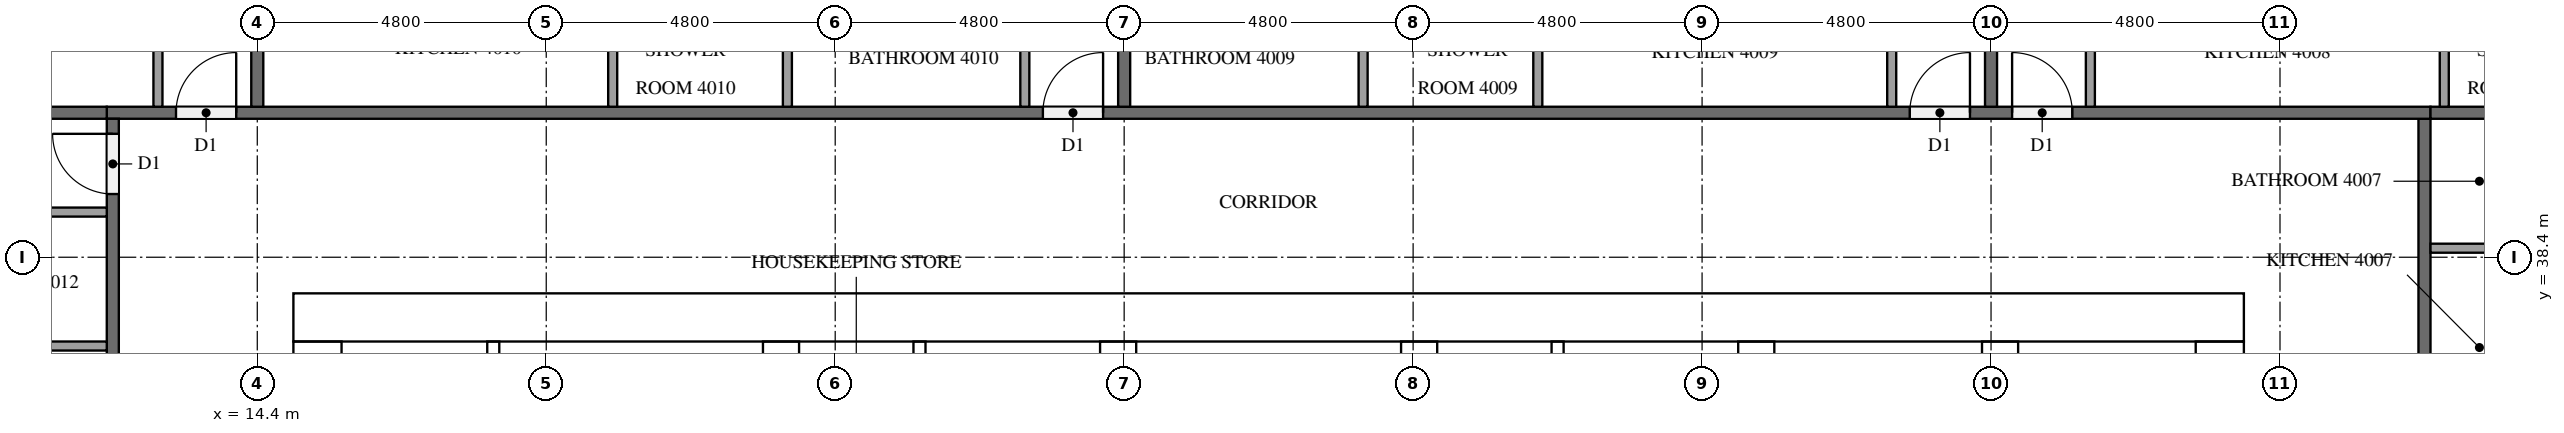
"""IFC4 building model, lengths in metres.
Left out: names, types, materials, properties, quantities, classifications, styles, units other than length and angle.
Written with IfcOpenShell. Run it as: python <this file> out.ifc"""

import sys

from ifc_helpers import new_model, si_unit, direction, frame, frame_2d, origin, place, context, subcontext, project, spatial, rectangle, extrude, element, fill, save


model = new_model("IFC4")
c1 = context("Model", 3, precision=1e-05, world=origin(), true_north=direction((0.0, 1.0)))
c2 = subcontext(c1, "Body", "Model", "MODEL_VIEW")
j1 = project(units=[si_unit("LENGTHUNIT", "METRE"), si_unit("PLANEANGLEUNIT", "RADIAN")], contexts=[c1])
p1 = place(None, origin())
s1 = spatial("IfcSite", under=j1, at=p1, CompositionType="ELEMENT")
p2 = place(p1, origin())
s2 = spatial("IfcBuilding", under=s1, at=p2, CompositionType="ELEMENT")
p3 = place(p2, frame((0.0, 0.0, 156.0)))
s3 = spatial("IfcBuildingStorey", under=s2, at=p3, CompositionType="ELEMENT", Elevation=156.0)
p4 = place(p3, frame((15.0, 37.4, 0.0), z_axis=(0.0, 0.0, 1.0), x_axis=(1.0, 0.0, 0.0)))
e1 = element("IfcWall", 1, at=p4, inside=s3, PredefinedType="SHEAR", context=c2, shape_type="SweptSolid", body=[
    extrude(rectangle(XDim=32.4, YDim=0.8, at=frame_2d((16.2, 0.0))), origin(), (0.0, 0.0, 1.0), 3.2),
])
p5 = place(p4, frame((15.3, 0.0, 0.0)))
e2 = element("IfcOpeningElement", 2, at=p5, cuts=e1, PredefinedType="OPENING", context=c2, shape_type="SweptSolid", body=[
    extrude(rectangle(XDim=1.8, YDim=2.1, at=frame_2d((0.9, 1.05))), frame((0.0, 0.41, 0.0), z_axis=(0.0, -1.0, 0.0), x_axis=(1.0, 0.0, 0.0)), (0.0, 0.0, 1.0), 0.82),
])
p6 = place(p4, frame((1.51, 0.0, 0.0)))
e3 = element("IfcOpeningElement", 3, at=p6, cuts=e1, PredefinedType="OPENING", context=c2, shape_type="SweptSolid", body=[
    extrude(rectangle(XDim=1.0, YDim=2.1, at=frame_2d((0.5, 1.05))), frame((0.0, 0.41, 0.0), z_axis=(0.0, -1.0, 0.0), x_axis=(1.0, 0.0, 0.0)), (0.0, 0.0, 1.0), 0.82),
])
p7 = place(p4, frame((5.11, 0.0, 0.0)))
e4 = element("IfcOpeningElement", 4, at=p7, cuts=e1, PredefinedType="OPENING", context=c2, shape_type="SweptSolid", body=[
    extrude(rectangle(XDim=1.0, YDim=2.1, at=frame_2d((0.5, 1.05))), frame((0.0, 0.41, 0.0), z_axis=(0.0, -1.0, 0.0), x_axis=(1.0, 0.0, 0.0)), (0.0, 0.0, 1.0), 0.82),
])
p8 = place(p3, frame((15.4, 15.8, 0.0), z_axis=(0.0, 0.0, 1.0), x_axis=(0.0, 1.0, 0.0)))
e5 = element("IfcWall", 5, at=p8, inside=s3, PredefinedType="SHEAR", context=c2, shape_type="SweptSolid", body=[
    extrude(rectangle(XDim=21.2, YDim=0.8, at=frame_2d((10.6, 0.0))), origin(), (0.0, 0.0, 1.0), 3.2),
])
p9 = place(p8, frame((4.96, 0.0, 0.0)))
e6 = element("IfcOpeningElement", 6, at=p9, cuts=e5, PredefinedType="OPENING", context=c2, shape_type="SweptSolid", body=[
    extrude(rectangle(XDim=1.2, YDim=2.1, at=frame_2d((0.6, 1.05))), frame((0.0, 0.41, 0.0), z_axis=(0.0, -1.0, 0.0), x_axis=(1.0, 0.0, 0.0)), (0.0, 0.0, 1.0), 0.82),
])
p10 = place(p3, frame((47.0, 15.8, 0.0), z_axis=(0.0, 0.0, 1.0), x_axis=(0.0, 1.0, 0.0)))
e7 = element("IfcWall", 7, at=p10, inside=s3, PredefinedType="SHEAR", context=c2, shape_type="SweptSolid", body=[
    extrude(rectangle(XDim=21.2, YDim=0.8, at=frame_2d((10.6, 0.0))), origin(), (0.0, 0.0, 1.0), 3.2),
])
p11 = place(p10, frame((10.3, 0.0, 0.0)))
e8 = element("IfcOpeningElement", 8, at=p11, cuts=e7, PredefinedType="OPENING", context=c2, shape_type="SweptSolid", body=[
    extrude(rectangle(XDim=1.2, YDim=2.1, at=frame_2d((0.6, 1.05))), frame((0.0, 0.41, 0.0), z_axis=(0.0, -1.0, 0.0), x_axis=(1.0, 0.0, 0.0)), (0.0, 0.0, 1.0), 0.82),
])
p12 = place(p3, frame((23.1, 15.8, 0.0), z_axis=(0.0, 0.0, 1.0), x_axis=(0.0, 1.0, 0.0)))
e9 = element("IfcWall", 9, at=p12, inside=s3, PredefinedType="SHEAR", context=c2, shape_type="SweptSolid", body=[
    extrude(rectangle(XDim=21.2, YDim=0.6, at=frame_2d((10.6, 0.0))), origin(), (0.0, 0.0, 1.0), 3.2),
])
p13 = place(p3, frame((39.3, 27.75, 0.0), z_axis=(0.0, 0.0, 1.0), x_axis=(0.0, 1.0, 0.0)))
e10 = element("IfcWall", 10, at=p13, inside=s3, PredefinedType="SHEAR", context=c2, shape_type="SweptSolid", body=[
    extrude(rectangle(XDim=9.25, YDim=0.6, at=frame_2d((4.625, 0.0))), origin(), (0.0, 0.0, 1.0), 3.2),
])
p14 = place(p3, frame((43.35, 27.75, 0.0), z_axis=(0.0, 0.0, 1.0), x_axis=(0.0, 1.0, 0.0)))
e11 = element("IfcWall", 11, at=p14, inside=s3, PredefinedType="SHEAR", context=c2, shape_type="SweptSolid", body=[
    extrude(rectangle(XDim=9.25, YDim=0.6, at=frame_2d((4.625, 0.0))), origin(), (0.0, 0.0, 1.0), 3.2),
])
p15 = place(p14, frame((7.65, 0.0, 0.0)))
e12 = element("IfcOpeningElement", 12, at=p15, cuts=e11, PredefinedType="OPENING", context=c2, shape_type="SweptSolid", body=[
    extrude(rectangle(XDim=1.2, YDim=2.1, at=frame_2d((0.6, 1.05))), frame((0.0, 0.31, 0.0), z_axis=(0.0, -1.0, 0.0), x_axis=(1.0, 0.0, 0.0)), (0.0, 0.0, 1.0), 0.62),
])
for number, where, z_axis, x_axis in (
    (13, (28.7, 33.85, 0.0), (0.0, 0.0, 1.0), (0.0, 1.0, 0.0)),
    (14, (33.7, 33.85, 0.0), (0.0, 0.0, 1.0), (0.0, 1.0, 0.0)),
):
    element("IfcWall", number, at=place(p3, frame(where, z_axis=z_axis, x_axis=x_axis)), inside=s3, PredefinedType="SHEAR", context=c2, shape_type="SweptSolid", body=[
        extrude(rectangle(XDim=3.15, YDim=0.6, at=frame_2d((1.575, 0.0))), origin(), (0.0, 0.0, 1.0), 3.2),
    ])
p16 = place(p3, frame((18.32, 31.55, 0.0), z_axis=(0.0, 0.0, 1.0), x_axis=(0.0, 1.0, 0.0)))
e15 = element("IfcWall", 15, at=p16, inside=s3, PredefinedType="PARTITIONING", context=c2, shape_type="SweptSolid", body=[
    extrude(rectangle(XDim=5.45, YDim=0.2, at=frame_2d((2.725, 0.0))), origin(), (0.0, 0.0, 1.0), 3.2),
])
for number, where, z_axis, x_axis in (
    (16, (25.4, 33.85, 0.0), (0.0, 0.0, 1.0), (0.0, 1.0, 0.0)),
    (17, (36.0, 33.85, 0.0), (0.0, 0.0, 1.0), (0.0, 1.0, 0.0)),
):
    element("IfcWall", number, at=place(p3, frame(where, z_axis=z_axis, x_axis=x_axis)), inside=s3, PredefinedType="PARTITIONING", context=c2, shape_type="SweptSolid", body=[
        extrude(rectangle(XDim=3.15, YDim=0.2, at=frame_2d((1.575, 0.0))), origin(), (0.0, 0.0, 1.0), 3.2),
    ])
p17 = place(p3, frame((50.4, 40.7, 0.0), z_axis=(0.0, 0.0, 1.0), x_axis=(0.0, -1.0, 0.0)))
e18 = element("IfcWall", 18, at=p17, inside=s3, PredefinedType="PARTITIONING", context=c2, shape_type="SweptSolid", body=[
    extrude(rectangle(XDim=28.6, YDim=0.2, at=frame_2d((14.3, 0.0))), origin(), (0.0, 0.0, 1.0), 3.2),
])
p18 = place(p17, frame((17.05, 0.0, 0.0)))
e19 = element("IfcOpeningElement", 19, at=p18, cuts=e18, PredefinedType="OPENING", context=c2, shape_type="SweptSolid", body=[
    extrude(rectangle(XDim=1.0, YDim=2.1, at=frame_2d((0.5, 1.05))), frame((0.0, 0.11, 0.0), z_axis=(0.0, -1.0, 0.0), x_axis=(1.0, 0.0, 0.0)), (0.0, 0.0, 1.0), 0.22),
])
p19 = place(p17, frame((15.35, 0.0, 0.0)))
e20 = element("IfcOpeningElement", 20, at=p19, cuts=e18, PredefinedType="OPENING", context=c2, shape_type="SweptSolid", body=[
    extrude(rectangle(XDim=1.0, YDim=2.1, at=frame_2d((0.5, 1.05))), frame((0.0, 0.11, 0.0), z_axis=(0.0, -1.0, 0.0), x_axis=(1.0, 0.0, 0.0)), (0.0, 0.0, 1.0), 0.22),
])
p20 = place(p17, frame((5.75, 0.0, 0.0)))
e21 = element("IfcOpeningElement", 21, at=p20, cuts=e18, PredefinedType="OPENING", context=c2, shape_type="SweptSolid", body=[
    extrude(rectangle(XDim=1.0, YDim=2.1, at=frame_2d((0.5, 1.05))), frame((0.0, 0.11, 0.0), z_axis=(0.0, -1.0, 0.0), x_axis=(1.0, 0.0, 0.0)), (0.0, 0.0, 1.0), 0.22),
])
p21 = place(p3, frame((11.9, 40.8, 0.0), z_axis=(0.0, 0.0, 1.0), x_axis=(1.0, 0.0, 0.0)))
e22 = element("IfcWall", 22, at=p21, inside=s3, PredefinedType="PARTITIONING", context=c2, shape_type="SweptSolid", body=[
    extrude(rectangle(XDim=38.6, YDim=0.2, at=frame_2d((19.3, 0.0))), origin(), (0.0, 0.0, 1.0), 3.2),
])
p22 = place(p21, frame((31.65, 0.0, 0.0)))
e23 = element("IfcOpeningElement", 23, at=p22, cuts=e22, PredefinedType="OPENING", context=c2, shape_type="SweptSolid", body=[
    extrude(rectangle(XDim=1.0, YDim=2.1, at=frame_2d((0.5, 1.05))), frame((0.0, 0.11, 0.0), z_axis=(0.0, -1.0, 0.0), x_axis=(1.0, 0.0, 0.0)), (0.0, 0.0, 1.0), 0.22),
])
p23 = place(p21, frame((29.95, 0.0, 0.0)))
e24 = element("IfcOpeningElement", 24, at=p23, cuts=e22, PredefinedType="OPENING", context=c2, shape_type="SweptSolid", body=[
    extrude(rectangle(XDim=1.0, YDim=2.1, at=frame_2d((0.5, 1.05))), frame((0.0, 0.11, 0.0), z_axis=(0.0, -1.0, 0.0), x_axis=(1.0, 0.0, 0.0)), (0.0, 0.0, 1.0), 0.22),
])
p24 = place(p21, frame((15.55, 0.0, 0.0)))
e25 = element("IfcOpeningElement", 25, at=p24, cuts=e22, PredefinedType="OPENING", context=c2, shape_type="SweptSolid", body=[
    extrude(rectangle(XDim=1.0, YDim=2.1, at=frame_2d((0.5, 1.05))), frame((0.0, 0.11, 0.0), z_axis=(0.0, -1.0, 0.0), x_axis=(1.0, 0.0, 0.0)), (0.0, 0.0, 1.0), 0.22),
])
p25 = place(p21, frame((1.15, 0.0, 0.0)))
e26 = element("IfcOpeningElement", 26, at=p25, cuts=e22, PredefinedType="OPENING", context=c2, shape_type="SweptSolid", body=[
    extrude(rectangle(XDim=1.0, YDim=2.1, at=frame_2d((0.5, 1.05))), frame((0.0, 0.11, 0.0), z_axis=(0.0, -1.0, 0.0), x_axis=(1.0, 0.0, 0.0)), (0.0, 0.0, 1.0), 0.22),
])
p26 = place(p3, frame((12.0, 12.1, 0.0), z_axis=(0.0, 0.0, 1.0), x_axis=(0.0, 1.0, 0.0)))
e27 = element("IfcWall", 27, at=p26, inside=s3, PredefinedType="PARTITIONING", context=c2, shape_type="SweptSolid", body=[
    extrude(rectangle(XDim=28.6, YDim=0.2, at=frame_2d((14.3, 0.0))), origin(), (0.0, 0.0, 1.0), 3.2),
])
p27 = place(p26, frame((27.35, 0.0, 0.0)))
e28 = element("IfcOpeningElement", 28, at=p27, cuts=e27, PredefinedType="OPENING", context=c2, shape_type="SweptSolid", body=[
    extrude(rectangle(XDim=1.0, YDim=2.1, at=frame_2d((0.5, 1.05))), frame((0.0, 0.11, 0.0), z_axis=(0.0, -1.0, 0.0), x_axis=(1.0, 0.0, 0.0)), (0.0, 0.0, 1.0), 0.22),
])
p28 = place(p26, frame((20.15, 0.0, 0.0)))
e29 = element("IfcOpeningElement", 29, at=p28, cuts=e27, PredefinedType="OPENING", context=c2, shape_type="SweptSolid", body=[
    extrude(rectangle(XDim=1.0, YDim=2.1, at=frame_2d((0.5, 1.05))), frame((0.0, 0.11, 0.0), z_axis=(0.0, -1.0, 0.0), x_axis=(1.0, 0.0, 0.0)), (0.0, 0.0, 1.0), 0.22),
])
p29 = place(p26, frame((10.55, 0.0, 0.0)))
e30 = element("IfcOpeningElement", 30, at=p29, cuts=e27, PredefinedType="OPENING", context=c2, shape_type="SweptSolid", body=[
    extrude(rectangle(XDim=1.0, YDim=2.1, at=frame_2d((0.5, 1.05))), frame((0.0, 0.11, 0.0), z_axis=(0.0, -1.0, 0.0), x_axis=(1.0, 0.0, 0.0)), (0.0, 0.0, 1.0), 0.22),
])
p30 = place(p3, frame((50.5, 40.8, 0.0), z_axis=(0.0, 0.0, 1.0), x_axis=(1.0, 0.0, 0.0)))
e31 = element("IfcWall", 31, at=p30, inside=s3, PredefinedType="PARTITIONING", context=c2, shape_type="SweptSolid", body=[
    extrude(rectangle(XDim=7.0, YDim=0.2, at=frame_2d((3.5, 0.0))), origin(), (0.0, 0.0, 1.0), 3.2),
])
p31 = place(p3, frame((43.2, 47.625, 0.0), z_axis=(0.0, 0.0, 1.0), x_axis=(0.0, -1.0, 0.0)))
e32 = element("IfcWall", 32, at=p31, inside=s3, PredefinedType="PARTITIONING", context=c2, shape_type="SweptSolid", body=[
    extrude(rectangle(XDim=6.725, YDim=0.2, at=frame_2d((3.363, 0.0))), origin(), (0.0, 0.0, 1.0), 3.2),
])
p32 = place(p3, frame((28.8, 47.9, 0.0), z_axis=(0.0, 0.0, 1.0), x_axis=(0.0, -1.0, 0.0)))
e33 = element("IfcWall", 33, at=p32, inside=s3, PredefinedType="PARTITIONING", context=c2, shape_type="SweptSolid", body=[
    extrude(rectangle(XDim=7.0, YDim=0.2, at=frame_2d((3.5, 0.0))), origin(), (0.0, 0.0, 1.0), 3.2),
])
p33 = place(p3, frame((14.4, 47.625, 0.0), z_axis=(0.0, 0.0, 1.0), x_axis=(0.0, -1.0, 0.0)))
e34 = element("IfcWall", 34, at=p33, inside=s3, PredefinedType="PARTITIONING", context=c2, shape_type="SweptSolid", body=[
    extrude(rectangle(XDim=6.725, YDim=0.2, at=frame_2d((3.363, 0.0))), origin(), (0.0, 0.0, 1.0), 3.2),
])
p34 = place(p3, frame((0.1, 40.8, 0.0), z_axis=(0.0, 0.0, 1.0), x_axis=(1.0, 0.0, 0.0)))
e35 = element("IfcWall", 35, at=p34, inside=s3, PredefinedType="PARTITIONING", context=c2, shape_type="SweptSolid", body=[
    extrude(rectangle(XDim=11.8, YDim=0.2, at=frame_2d((5.9, 0.0))), origin(), (0.0, 0.0, 1.0), 3.2),
])
p35 = place(p3, frame((50.5, 38.55, 0.0), z_axis=(0.0, 0.0, 1.0), x_axis=(1.0, 0.0, 0.0)))
e36 = element("IfcWall", 36, at=p35, inside=s3, PredefinedType="PARTITIONING", context=c2, shape_type="SweptSolid", body=[
    extrude(rectangle(XDim=1.625, YDim=0.15, at=frame_2d((0.812, 0.0))), origin(), (0.0, 0.0, 1.0), 3.2),
])
p36 = place(p3, frame((50.729, 40.9, 0.0), z_axis=(0.0, 0.0, 1.0), x_axis=(0.0, 1.0, 0.0)))
e37 = element("IfcWall", 37, at=p36, inside=s3, PredefinedType="PARTITIONING", context=c2, shape_type="SweptSolid", body=[
    extrude(rectangle(XDim=1.775, YDim=0.15, at=frame_2d((0.888, 0.0))), origin(), (0.0, 0.0, 1.0), 3.2),
])
p37 = place(p3, frame((44.85, 40.9, 0.0), z_axis=(0.0, 0.0, 1.0), x_axis=(0.0, 1.0, 0.0)))
e38 = element("IfcWall", 38, at=p37, inside=s3, PredefinedType="PARTITIONING", context=c2, shape_type="SweptSolid", body=[
    extrude(rectangle(XDim=1.925, YDim=0.15, at=frame_2d((0.962, 0.0))), origin(), (0.0, 0.0, 1.0), 3.2),
])
for number, where, z_axis, x_axis in (
    (39, (35.671, 40.9, 0.0), (0.0, 0.0, 1.0), (0.0, 1.0, 0.0)),
    (40, (32.769, 40.9, 0.0), (0.0, 0.0, 1.0), (0.0, 1.0, 0.0)),
):
    element("IfcWall", number, at=place(p3, frame(where, z_axis=z_axis, x_axis=x_axis)), inside=s3, PredefinedType="PARTITIONING", context=c2, shape_type="SweptSolid", body=[
        extrude(rectangle(XDim=1.775, YDim=0.15, at=frame_2d((0.888, 0.0))), origin(), (0.0, 0.0, 1.0), 3.2),
    ])
p38 = place(p3, frame((41.55, 40.9, 0.0), z_axis=(0.0, 0.0, 1.0), x_axis=(0.0, 1.0, 0.0)))
e41 = element("IfcWall", 41, at=p38, inside=s3, PredefinedType="PARTITIONING", context=c2, shape_type="SweptSolid", body=[
    extrude(rectangle(XDim=1.925, YDim=0.15, at=frame_2d((0.962, 0.0))), origin(), (0.0, 0.0, 1.0), 3.2),
])
for number, where, z_axis, x_axis in (
    (42, (23.206, 40.9, 0.0), (0.0, 0.0, 1.0), (0.0, 1.0, 0.0)),
    (43, (20.304, 40.9, 0.0), (0.0, 0.0, 1.0), (0.0, 1.0, 0.0)),
):
    element("IfcWall", number, at=place(p3, frame(where, z_axis=z_axis, x_axis=x_axis)), inside=s3, PredefinedType="PARTITIONING", context=c2, shape_type="SweptSolid", body=[
        extrude(rectangle(XDim=1.775, YDim=0.15, at=frame_2d((0.888, 0.0))), origin(), (0.0, 0.0, 1.0), 3.2),
    ])
p39 = place(p3, frame((27.15, 40.9, 0.0), z_axis=(0.0, 0.0, 1.0), x_axis=(0.0, 1.0, 0.0)))
e44 = element("IfcWall", 44, at=p39, inside=s3, PredefinedType="PARTITIONING", context=c2, shape_type="SweptSolid", body=[
    extrude(rectangle(XDim=1.925, YDim=0.15, at=frame_2d((0.962, 0.0))), origin(), (0.0, 0.0, 1.0), 3.2),
])
p40 = place(p3, frame((12.75, 40.9, 0.0), z_axis=(0.0, 0.0, 1.0), x_axis=(0.0, 1.0, 0.0)))
e45 = element("IfcWall", 45, at=p40, inside=s3, PredefinedType="PARTITIONING", context=c2, shape_type="SweptSolid", body=[
    extrude(rectangle(XDim=2.225, YDim=0.15, at=frame_2d((1.113, 0.0))), origin(), (0.0, 0.0, 1.0), 3.2),
])
p41 = place(p3, frame((11.9, 36.925, 0.0), z_axis=(0.0, 0.0, 1.0), x_axis=(-1.0, 0.0, 0.0)))
e46 = element("IfcWall", 46, at=p41, inside=s3, PredefinedType="PARTITIONING", context=c2, shape_type="SweptSolid", body=[
    extrude(rectangle(XDim=3.725, YDim=0.15, at=frame_2d((1.862, 0.0))), origin(), (0.0, 0.0, 1.0), 3.2),
])
p42 = place(p3, frame((11.9, 39.15, 0.0), z_axis=(0.0, 0.0, 1.0), x_axis=(-1.0, 0.0, 0.0)))
e47 = element("IfcWall", 47, at=p42, inside=s3, PredefinedType="PARTITIONING", context=c2, shape_type="SweptSolid", body=[
    extrude(rectangle(XDim=3.875, YDim=0.15, at=frame_2d((1.938, 0.0))), origin(), (0.0, 0.0, 1.0), 3.2),
])
p43 = place(p5, origin())
e48 = element("IfcDoor", 48, at=p43, inside=s3, OperationType="DOUBLE_DOOR_SINGLE_SWING", PredefinedType="DOOR", context=c2, shape_type="SweptSolid", body=[
    extrude(rectangle(XDim=1.8, YDim=2.1, at=frame_2d((0.9, 1.05))), frame((0.0, 0.025, 0.0), z_axis=(0.0, -1.0, 0.0), x_axis=(1.0, 0.0, 0.0)), (0.0, 0.0, 1.0), 0.05),
])
fill(e2, e48)
p44 = place(p6, origin())
e49 = element("IfcDoor", 49, at=p44, inside=s3, OperationType="SINGLE_SWING_LEFT", PredefinedType="DOOR", context=c2, shape_type="SweptSolid", body=[
    extrude(rectangle(XDim=1.0, YDim=2.1, at=frame_2d((0.5, 1.05))), frame((0.0, 0.025, 0.0), z_axis=(0.0, -1.0, 0.0), x_axis=(1.0, 0.0, 0.0)), (0.0, 0.0, 1.0), 0.05),
])
fill(e3, e49)
p45 = place(p7, origin())
e50 = element("IfcDoor", 50, at=p45, inside=s3, OperationType="SINGLE_SWING_RIGHT", PredefinedType="DOOR", context=c2, shape_type="SweptSolid", body=[
    extrude(rectangle(XDim=1.0, YDim=2.1, at=frame_2d((0.5, 1.05))), frame((0.0, 0.025, 0.0), z_axis=(0.0, -1.0, 0.0), x_axis=(1.0, 0.0, 0.0)), (0.0, 0.0, 1.0), 0.05),
])
fill(e4, e50)
p46 = place(p22, origin())
e51 = element("IfcDoor", 51, at=p46, inside=s3, OperationType="SINGLE_SWING_LEFT", PredefinedType="DOOR", context=c2, shape_type="SweptSolid", body=[
    extrude(rectangle(XDim=1.0, YDim=2.1, at=frame_2d((0.5, 1.05))), frame((0.0, 0.025, 0.0), z_axis=(0.0, -1.0, 0.0), x_axis=(1.0, 0.0, 0.0)), (0.0, 0.0, 1.0), 0.05),
])
fill(e23, e51)
p47 = place(p23, origin())
e52 = element("IfcDoor", 52, at=p47, inside=s3, OperationType="SINGLE_SWING_RIGHT", PredefinedType="DOOR", context=c2, shape_type="SweptSolid", body=[
    extrude(rectangle(XDim=1.0, YDim=2.1, at=frame_2d((0.5, 1.05))), frame((0.0, 0.025, 0.0), z_axis=(0.0, -1.0, 0.0), x_axis=(1.0, 0.0, 0.0)), (0.0, 0.0, 1.0), 0.05),
])
fill(e24, e52)
p48 = place(p24, origin())
e53 = element("IfcDoor", 53, at=p48, inside=s3, OperationType="SINGLE_SWING_RIGHT", PredefinedType="DOOR", context=c2, shape_type="SweptSolid", body=[
    extrude(rectangle(XDim=1.0, YDim=2.1, at=frame_2d((0.5, 1.05))), frame((0.0, 0.025, 0.0), z_axis=(0.0, -1.0, 0.0), x_axis=(1.0, 0.0, 0.0)), (0.0, 0.0, 1.0), 0.05),
])
fill(e25, e53)
p49 = place(p25, origin())
e54 = element("IfcDoor", 54, at=p49, inside=s3, OperationType="SINGLE_SWING_RIGHT", PredefinedType="DOOR", context=c2, shape_type="SweptSolid", body=[
    extrude(rectangle(XDim=1.0, YDim=2.1, at=frame_2d((0.5, 1.05))), frame((0.0, 0.025, 0.0), z_axis=(0.0, -1.0, 0.0), x_axis=(1.0, 0.0, 0.0)), (0.0, 0.0, 1.0), 0.05),
])
fill(e26, e54)
p50 = place(p27, origin())
e55 = element("IfcDoor", 55, at=p50, inside=s3, OperationType="SINGLE_SWING_RIGHT", PredefinedType="DOOR", context=c2, shape_type="SweptSolid", body=[
    extrude(rectangle(XDim=1.0, YDim=2.1, at=frame_2d((0.5, 1.05))), frame((0.0, 0.025, 0.0), z_axis=(0.0, -1.0, 0.0), x_axis=(1.0, 0.0, 0.0)), (0.0, 0.0, 1.0), 0.05),
])
fill(e28, e55)
save(model, sys.argv[1])
